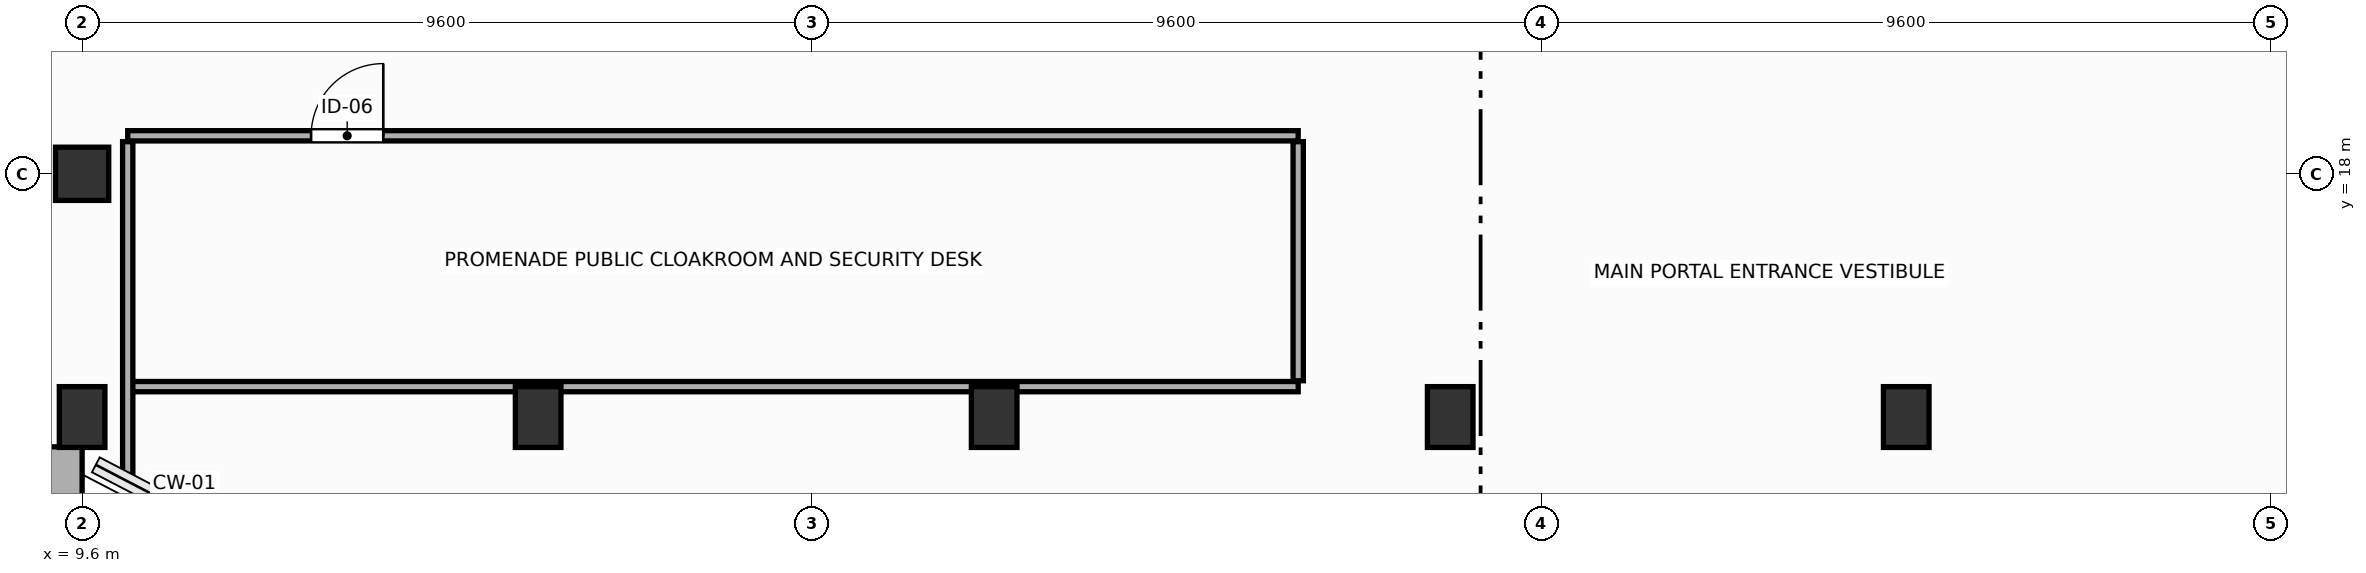
"""IFC4 building model, lengths in metres.
Left out: names, types, materials, properties, quantities, classifications, styles, units other than length and angle.
Written with IfcOpenShell. Run it as: python <this file> out.ifc"""

import sys

from ifc_helpers import new_model, si_unit, direction, frame, frame_2d, origin, origin_2d, place, context, subcontext, project, spatial, rectangle, extrude, element, fill, save


model = new_model("IFC4")
c1 = context("Model", 3, precision=1e-05, world=origin(), true_north=direction((0.0, 1.0)))
c2 = subcontext(c1, "Body", "Model", "MODEL_VIEW")
j1 = project(units=[si_unit("LENGTHUNIT", "METRE"), si_unit("PLANEANGLEUNIT", "RADIAN")], contexts=[c1])
p1 = place(None, origin())
s1 = spatial("IfcSite", under=j1, at=p1, CompositionType="ELEMENT")
p2 = place(p1, origin())
s2 = spatial("IfcBuilding", under=s1, at=p2, CompositionType="ELEMENT")
p3 = place(p2, origin())
s3 = spatial("IfcBuildingStorey", under=s2, at=p3, CompositionType="ELEMENT", Elevation=0.0)
p4 = place(p3, frame((9.6, 18.0, 0.0), z_axis=(0.0, 0.0, 1.0), x_axis=(1.0, 0.0, 0.0)))
e1 = element("IfcColumn", 1, at=p4, inside=s3, PredefinedType="COLUMN", context=c2, shape_type="SweptSolid", body=[
    extrude(rectangle(XDim=0.7, YDim=0.7, at=origin_2d()), origin(), (0.0, 0.0, 1.0), 5.4),
])
for number, where, z_axis, x_axis in (
    (2, (9.6, 14.8, 0.0), (0.0, 0.0, 1.0), (1.0, 0.0, 0.0)),
    (3, (15.6, 14.8, 0.0), (0.0, 0.0, 1.0), (1.0, 0.0, 0.0)),
    (4, (21.6, 14.8, 0.0), (0.0, 0.0, 1.0), (1.0, 0.0, 0.0)),
    (5, (27.6, 14.8, 0.0), (0.0, 0.0, 1.0), (1.0, 0.0, 0.0)),
    (6, (33.6, 14.8, 0.0), (0.0, 0.0, 1.0), (1.0, 0.0, 0.0)),
):
    element("IfcColumn", number, at=place(p3, frame(where, z_axis=z_axis, x_axis=x_axis)), inside=s3, PredefinedType="COLUMN", context=c2, shape_type="SweptSolid", body=[
        extrude(rectangle(XDim=0.6, YDim=0.8, at=origin_2d()), origin(), (0.0, 0.0, 1.0), 5.4),
    ])
p5 = place(p3, frame((9.36, 14.408, 0.0), z_axis=(0.0, 0.0, 1.0), x_axis=(0.0, -1.0, 0.0)))
e7 = element("IfcWall", 7, at=p5, inside=s3, PredefinedType="STANDARD", context=c2, shape_type="SweptSolid", body=[
    extrude(rectangle(XDim=5.666, YDim=0.48, at=frame_2d((2.833, 0.0))), origin(), (0.0, 0.0, 1.0), 4.33),
])
p6 = place(p5, frame((2.008, 0.0, 0.85)))
e8 = element("IfcOpeningElement", 8, at=p6, cuts=e7, PredefinedType="OPENING", context=c2, shape_type="SweptSolid", body=[
    extrude(rectangle(XDim=1.6, YDim=2.25, at=frame_2d((0.8, 1.125))), frame((0.0, 0.25, 0.0), z_axis=(0.0, -1.0, 0.0), x_axis=(1.0, 0.0, 0.0)), (0.0, 0.0, 1.0), 0.5),
])
p7 = place(p3, frame((10.2, 18.5, 0.0), z_axis=(0.0, 0.0, 1.0), x_axis=(1.0, 0.0, 0.0)))
e9 = element("IfcWall", 9, at=p7, inside=s3, PredefinedType="PARTITIONING", context=c2, shape_type="SweptSolid", body=[
    extrude(rectangle(XDim=15.4, YDim=0.135, at=frame_2d((7.7, 0.0))), origin(), (0.0, 0.0, 1.0), 5.125),
])
p8 = place(p7, frame((2.413, 0.0, 0.0)))
e10 = element("IfcOpeningElement", 10, at=p8, cuts=e9, PredefinedType="OPENING", context=c2, shape_type="SweptSolid", body=[
    extrude(rectangle(XDim=0.95, YDim=2.15, at=frame_2d((0.475, 1.075))), frame((0.0, 0.077, 0.0), z_axis=(0.0, -1.0, 0.0), x_axis=(1.0, 0.0, 0.0)), (0.0, 0.0, 1.0), 0.155),
])
p9 = place(p3, frame((25.6, 15.2, 0.0), z_axis=(0.0, 0.0, 1.0), x_axis=(-1.0, 0.0, 0.0)))
e11 = element("IfcWall", 11, at=p9, inside=s3, PredefinedType="PARTITIONING", context=c2, shape_type="SweptSolid", body=[
    extrude(rectangle(XDim=15.4, YDim=0.135, at=frame_2d((7.7, 0.0))), origin(), (0.0, 0.0, 1.0), 4.43),
])
p10 = place(p3, frame((10.2, 14.043, 0.0), z_axis=(0.0, 0.0, 1.0), x_axis=(0.0, 1.0, 0.0)))
e12 = element("IfcWall", 12, at=p10, inside=s3, PredefinedType="PARTITIONING", context=c2, shape_type="SweptSolid", body=[
    extrude(rectangle(XDim=4.38, YDim=0.135, at=frame_2d((2.19, 0.0))), origin(), (0.0, 0.0, 1.0), 4.43),
])
p11 = place(p3, frame((25.6, 18.423, 0.0), z_axis=(0.0, 0.0, 1.0), x_axis=(0.0, -1.0, 0.0)))
e13 = element("IfcWall", 13, at=p11, inside=s3, PredefinedType="PARTITIONING", context=c2, shape_type="SweptSolid", body=[
    extrude(rectangle(XDim=3.145, YDim=0.135, at=frame_2d((1.573, 0.0))), origin(), (0.0, 0.0, 1.0), 5.125),
])
p12 = place(p8, origin())
e14 = element("IfcDoor", 14, at=p12, inside=s3, OperationType="SINGLE_SWING_RIGHT", PredefinedType="DOOR", context=c2, shape_type="SweptSolid", body=[
    extrude(rectangle(XDim=0.95, YDim=2.15, at=frame_2d((0.475, 1.075))), frame((0.0, 0.025, 0.0), z_axis=(0.0, -1.0, 0.0), x_axis=(1.0, 0.0, 0.0)), (0.0, 0.0, 1.0), 0.05),
])
fill(e10, e14)
save(model, sys.argv[1])
